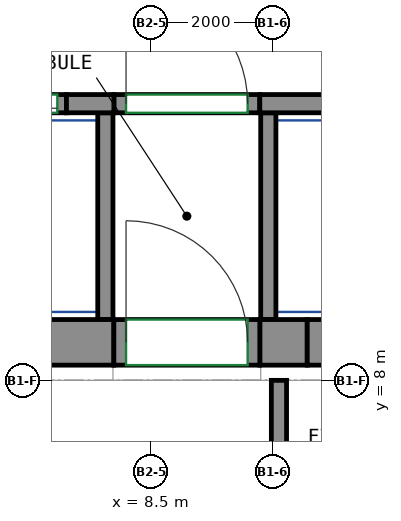
"""IFC4 building model, lengths in metres.
Left out: names, types, materials, properties, quantities, classifications, styles, units other than length and angle.
Written with IfcOpenShell. Run it as: python <this file> out.ifc"""

import sys

from ifc_helpers import new_model, si_unit, direction, frame, frame_2d, origin, place, context, subcontext, project, spatial, rectangle, extrude, source, transform, mapped, element, fill, save


model = new_model("IFC4")
c1 = context("Model", 3, precision=1e-05, world=origin(), true_north=direction((0.0, 1.0)))
c2 = subcontext(c1, "Body", "Model", "MODEL_VIEW")
j1 = project(units=[si_unit("LENGTHUNIT", "METRE"), si_unit("PLANEANGLEUNIT", "RADIAN")], contexts=[c1])
p1 = place(None, origin())
s1 = spatial("IfcSite", under=j1, at=p1, CompositionType="ELEMENT")
p2 = place(p1, origin())
s2 = spatial("IfcBuilding", under=s1, at=p2, CompositionType="ELEMENT")
p3 = place(p2, frame((0.0, 0.0, 256.0)))
s3 = spatial("IfcBuildingStorey", under=s2, at=p3, CompositionType="ELEMENT", Elevation=256.0)
m1 = source(origin(), c2, "Body", "SweptSolid", [
    extrude(rectangle(XDim=14.18, YDim=0.75, at=frame_2d((7.09, 0.0))), origin(), (0.0, 0.0, 1.0), 3.12),
])
p4 = place(p3, frame((-6.29, 8.625, 0.0), z_axis=(0.0, 0.0, 1.0), x_axis=(1.0, 0.0, 0.0)))
e1 = element("IfcWall", 1, at=p4, inside=s3, PredefinedType="SHEAR", context=c2, shape_type="MappedRepresentation", body=[
    mapped(m1, transform((0.0, 0.0, 0.0))),
])
m2 = source(origin(), c2, "Body", "SweptSolid", [
    extrude(rectangle(XDim=0.78, YDim=0.75, at=frame_2d((0.39, 0.0))), origin(), (0.0, 0.0, 1.0), 3.12),
])
p5 = place(p3, frame((10.29, 8.625, 0.0), z_axis=(0.0, 0.0, 1.0), x_axis=(1.0, 0.0, 0.0)))
e2 = element("IfcWall", 2, at=p5, inside=s3, PredefinedType="SHEAR", context=c2, shape_type="MappedRepresentation", body=[
    mapped(m2, transform((0.0, 0.0, 0.0))),
])
m3 = source(origin(), c2, "Body", "SweptSolid", [
    extrude(rectangle(XDim=0.78, YDim=0.3, at=frame_2d((0.39, 0.0))), origin(), (0.0, 0.0, 1.0), 3.12),
])
p6 = place(p3, frame((7.11, 12.55, 0.0), z_axis=(0.0, 0.0, 1.0), x_axis=(1.0, 0.0, 0.0)))
e3 = element("IfcWall", 3, at=p6, inside=s3, PredefinedType="SHEAR", context=c2, shape_type="MappedRepresentation", body=[
    mapped(m3, transform((0.0, 0.0, 0.0))),
])
m4 = source(origin(), c2, "Body", "SweptSolid", [
    extrude(rectangle(XDim=2.82, YDim=0.3, at=frame_2d((1.41, 0.0))), origin(), (0.0, 0.0, 1.0), 3.12),
])
p7 = place(p3, frame((10.29, 12.55, 0.0), z_axis=(0.0, 0.0, 1.0), x_axis=(1.0, 0.0, 0.0)))
e4 = element("IfcWall", 4, at=p7, inside=s3, PredefinedType="SHEAR", context=c2, shape_type="MappedRepresentation", body=[
    mapped(m4, transform((0.0, 0.0, 0.0))),
])
m5 = source(origin(), c2, "Body", "SweptSolid", [
    extrude(rectangle(XDim=1.4, YDim=0.3, at=frame_2d((0.7, 0.0))), origin(), (0.0, 0.0, 1.0), 3.12),
])
p8 = place(p3, frame((5.71, 12.55, 0.0), z_axis=(0.0, 0.0, 1.0), x_axis=(1.0, 0.0, 0.0)))
e5 = element("IfcWall", 5, at=p8, inside=s3, PredefinedType="PARTITIONING", context=c2, shape_type="MappedRepresentation", body=[
    mapped(m5, transform((0.0, 0.0, 0.0))),
])
p9 = place(p8, frame((0.15, 0.0, 0.0)))
e6 = element("IfcOpeningElement", 6, at=p9, cuts=e5, PredefinedType="OPENING", context=c2, shape_type="SweptSolid", body=[
    extrude(rectangle(XDim=1.1, YDim=2.1, at=frame_2d((0.55, 1.05))), frame((0.0, 0.16, 0.0), z_axis=(0.0, -1.0, 0.0), x_axis=(1.0, 0.0, 0.0)), (0.0, 0.0, 1.0), 0.32),
])
m6 = source(origin(), c2, "Body", "SweptSolid", [
    extrude(rectangle(XDim=2.4, YDim=0.3, at=frame_2d((1.2, 0.0))), origin(), (0.0, 0.0, 1.0), 3.12),
])
p10 = place(p3, frame((7.89, 12.55, 0.0), z_axis=(0.0, 0.0, 1.0), x_axis=(1.0, 0.0, 0.0)))
e7 = element("IfcWall", 7, at=p10, inside=s3, PredefinedType="PARTITIONING", context=c2, shape_type="MappedRepresentation", body=[
    mapped(m6, transform((0.0, 0.0, 0.0))),
])
p11 = place(p10, frame((0.2, 0.0, 0.0)))
e8 = element("IfcOpeningElement", 8, at=p11, cuts=e7, PredefinedType="OPENING", context=c2, shape_type="SweptSolid", body=[
    extrude(rectangle(XDim=2.0, YDim=2.1, at=frame_2d((1.0, 1.05))), frame((0.0, 0.16, 0.0), z_axis=(0.0, -1.0, 0.0), x_axis=(1.0, 0.0, 0.0)), (0.0, 0.0, 1.0), 0.32),
])
m7 = source(origin(), c2, "Body", "SweptSolid", [
    extrude(rectangle(XDim=2.65, YDim=0.25, at=frame_2d((1.325, 0.0))), origin(), (0.0, 0.0, 1.0), 2.57),
])
p12 = place(p3, frame((10.605, 5.35, 0.0), z_axis=(0.0, 0.0, 1.0), x_axis=(0.0, 1.0, 0.0)))
e9 = element("IfcWall", 9, at=p12, inside=s3, PredefinedType="PARTITIONING", context=c2, shape_type="MappedRepresentation", body=[
    mapped(m7, transform((0.0, 0.0, 0.0))),
])
m8 = source(origin(), c2, "Body", "SweptSolid", [
    extrude(rectangle(XDim=3.4, YDim=0.25, at=frame_2d((1.7, 0.0))), origin(), (0.0, 0.0, 1.0), 3.12),
])
for number, where, z_axis, x_axis in (
    (10, (10.43, 9.0, 0.0), (0.0, 0.0, 1.0), (0.0, 1.0, 0.0)),
    (11, (7.75, 9.0, 0.0), (0.0, 0.0, 1.0), (0.0, 1.0, 0.0)),
):
    element("IfcWall", number, at=place(p3, frame(where, z_axis=z_axis, x_axis=x_axis)), inside=s3, PredefinedType="PARTITIONING", context=c2, shape_type="MappedRepresentation", body=[
        mapped(m8, transform((0.0, 0.0, 0.0))),
    ])
m9 = source(origin(), c2, "Body", "SweptSolid", [
    extrude(rectangle(XDim=2.4, YDim=0.75, at=frame_2d((1.2, 0.0))), origin(), (0.0, 0.0, 1.0), 2.7),
])
p13 = place(p3, frame((7.89, 8.625, 0.0), z_axis=(0.0, 0.0, 1.0), x_axis=(1.0, 0.0, 0.0)))
e12 = element("IfcWall", 12, at=p13, inside=s3, PredefinedType="PARTITIONING", context=c2, shape_type="MappedRepresentation", body=[
    mapped(m9, transform((0.0, 0.0, 0.0))),
])
p14 = place(p13, frame((0.2, 0.0, 0.0)))
e13 = element("IfcOpeningElement", 13, at=p14, cuts=e12, PredefinedType="OPENING", context=c2, shape_type="SweptSolid", body=[
    extrude(rectangle(XDim=2.0, YDim=2.1, at=frame_2d((1.0, 1.05))), frame((0.0, 0.385, 0.0), z_axis=(0.0, -1.0, 0.0), x_axis=(1.0, 0.0, 0.0)), (0.0, 0.0, 1.0), 0.77),
])
m10 = source(origin(), c2, "Body", "SweptSolid", [
    extrude(rectangle(XDim=1.4, YDim=0.75, at=frame_2d((0.7, 0.0))), origin(), (0.0, 0.0, 1.0), 2.7),
])
p15 = place(p3, frame((11.07, 8.625, 0.0), z_axis=(0.0, 0.0, 1.0), x_axis=(1.0, 0.0, 0.0)))
e14 = element("IfcWall", 14, at=p15, inside=s3, PredefinedType="PARTITIONING", context=c2, shape_type="MappedRepresentation", body=[
    mapped(m10, transform((0.0, 0.0, 0.0))),
])
p16 = place(p15, frame((0.25, 0.0, 0.0)))
e15 = element("IfcOpeningElement", 15, at=p16, cuts=e14, PredefinedType="OPENING", context=c2, shape_type="SweptSolid", body=[
    extrude(rectangle(XDim=0.9, YDim=2.1, at=frame_2d((0.45, 1.05))), frame((0.0, 0.385, 0.0), z_axis=(0.0, -1.0, 0.0), x_axis=(1.0, 0.0, 0.0)), (0.0, 0.0, 1.0), 0.77),
])
p17 = place(p11, origin())
e16 = element("IfcDoor", 16, at=p17, inside=s3, OperationType="DOUBLE_DOOR_SINGLE_SWING", PredefinedType="DOOR", context=c2, shape_type="SweptSolid", body=[
    extrude(rectangle(XDim=2.0, YDim=2.1, at=frame_2d((1.0, 1.05))), frame((0.0, 0.025, 0.0), z_axis=(0.0, -1.0, 0.0), x_axis=(1.0, 0.0, 0.0)), (0.0, 0.0, 1.0), 0.05),
])
fill(e8, e16)
p18 = place(p14, origin())
e17 = element("IfcDoor", 17, at=p18, inside=s3, OperationType="DOUBLE_DOOR_SINGLE_SWING", PredefinedType="DOOR", context=c2, shape_type="SweptSolid", body=[
    extrude(rectangle(XDim=2.0, YDim=2.1, at=frame_2d((1.0, 1.05))), frame((0.0, 0.28, 0.0), z_axis=(0.0, -1.0, 0.0), x_axis=(1.0, 0.0, 0.0)), (0.0, 0.0, 1.0), 0.05),
])
fill(e13, e17)
p19 = place(p9, origin())
e18 = element("IfcDoor", 18, at=p19, inside=s3, OperationType="DOUBLE_DOOR_SLIDING", PredefinedType="DOOR", context=c2, shape_type="SweptSolid", body=[
    extrude(rectangle(XDim=1.1, YDim=2.1, at=frame_2d((0.55, 1.05))), frame((0.0, 0.025, 0.0), z_axis=(0.0, -1.0, 0.0), x_axis=(1.0, 0.0, 0.0)), (0.0, 0.0, 1.0), 0.05),
])
fill(e6, e18)
save(model, sys.argv[1])
